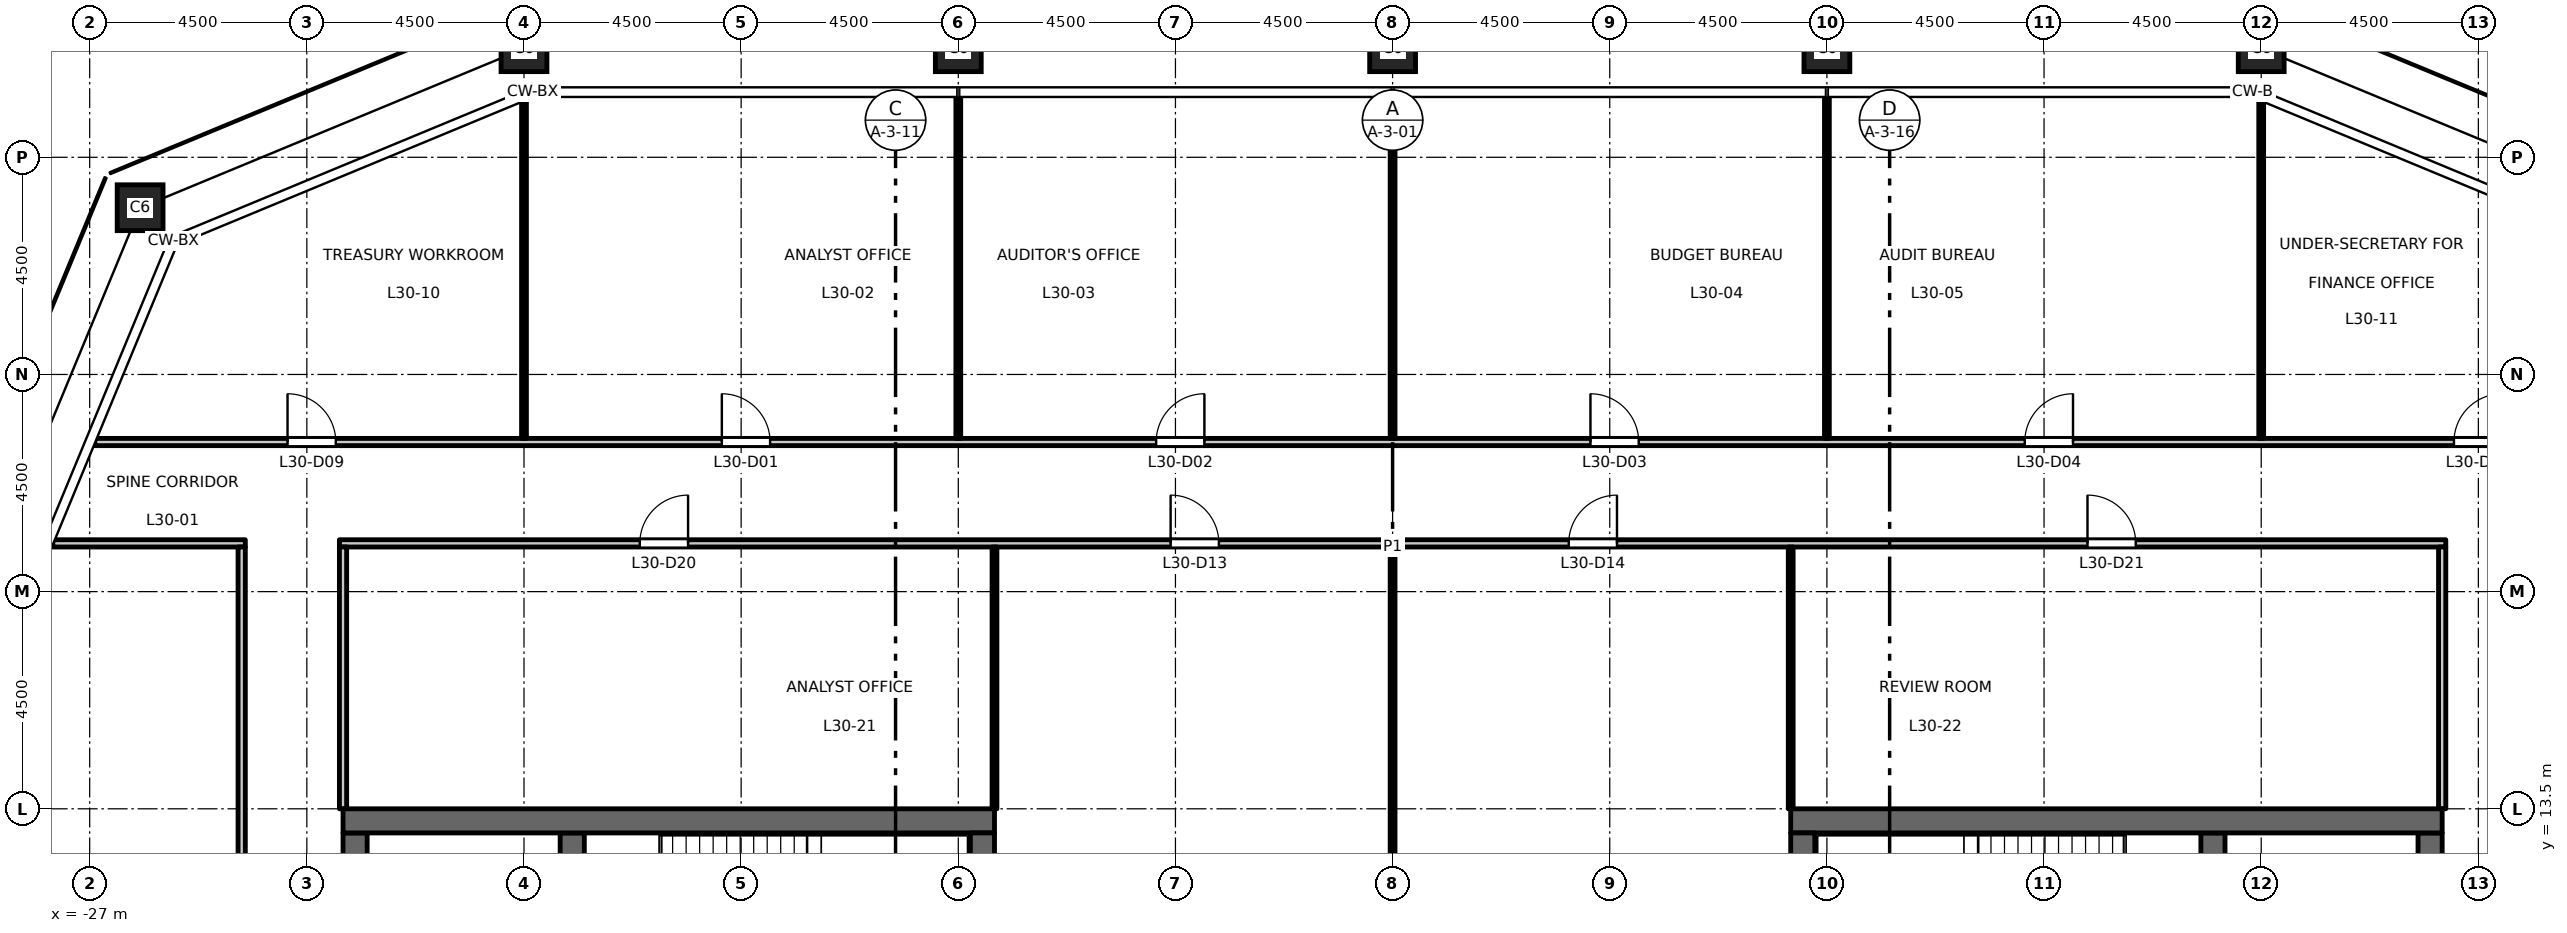
"""IFC4 building model, lengths in metres.
Left out: names, types, materials, properties, quantities, classifications, styles, units other than length and angle.
Written with IfcOpenShell. Run it as: python <this file> out.ifc"""

import sys

from ifc_helpers import new_model, si_unit, direction, frame, frame_2d, origin, origin_2d, place, context, subcontext, project, spatial, rectangle, hollow_rectangle, extrude, element, fill, save


model = new_model("IFC4")
c1 = context("Model", 3, precision=1e-05, world=origin(), true_north=direction((0.0, 1.0)))
c2 = subcontext(c1, "Body", "Model", "MODEL_VIEW")
j1 = project(units=[si_unit("LENGTHUNIT", "METRE"), si_unit("PLANEANGLEUNIT", "RADIAN")], contexts=[c1])
p1 = place(None, origin())
s1 = spatial("IfcSite", under=j1, at=p1, CompositionType="ELEMENT")
p2 = place(p1, origin())
s2 = spatial("IfcBuilding", under=s1, at=p2, CompositionType="ELEMENT")
p3 = place(p2, frame((0.0, 0.0, 140.7)))
s3 = spatial("IfcBuildingStorey", under=s2, at=p3, CompositionType="ELEMENT", Elevation=140.7)
for number, where, z_axis, x_axis in (
    (1, (18.0, 29.25, 0.0), (0.0, 0.0, 1.0), (1.0, 0.0, 0.0)),
    (2, (9.0, 29.25, 0.0), (0.0, 0.0, 1.0), (1.0, 0.0, 0.0)),
    (3, (0.0, 29.25, 0.0), (0.0, 0.0, 1.0), (1.0, 0.0, 0.0)),
    (4, (-9.0, 29.25, 0.0), (0.0, 0.0, 1.0), (1.0, 0.0, 0.0)),
    (5, (-18.0, 29.25, 0.0), (0.0, 0.0, 1.0), (1.0, 0.0, 0.0)),
    (6, (-25.955, 25.955, 0.0), (0.0, 0.0, 1.0), (1.0, 0.0, 0.0)),
):
    element("IfcColumn", number, at=place(p3, frame(where, z_axis=z_axis, x_axis=x_axis)), inside=s3, PredefinedType="COLUMN", context=c2, shape_type="SweptSolid", body=[
        extrude(hollow_rectangle(XDim=0.95, YDim=0.95, WallThickness=0.055, at=origin_2d()), origin(), (0.0, 0.0, 1.0), 4.5),
    ])
p4 = place(p3, frame((-21.5, -13.0, 0.0), z_axis=(0.0, 0.0, 1.0), x_axis=(0.0, 1.0, 0.0)))
e7 = element("IfcWall", 7, at=p4, inside=s3, PredefinedType="SHEAR", context=c2, shape_type="SweptSolid", body=[
    extrude(rectangle(XDim=26.0, YDim=0.5, at=frame_2d((13.0, 0.0))), origin(), (0.0, 0.0, 1.0), 4.35),
])
p5 = place(p4, frame((16.825, 0.0, 0.0)))
e8 = element("IfcOpeningElement", 8, at=p5, cuts=e7, PredefinedType="OPENING", context=c2, shape_type="SweptSolid", body=[
    extrude(rectangle(XDim=1.8, YDim=2.1, at=frame_2d((0.9, 1.05))), frame((0.0, 0.26, 0.0), z_axis=(0.0, -1.0, 0.0), x_axis=(1.0, 0.0, 0.0)), (0.0, 0.0, 1.0), 0.52),
])
p6 = place(p4, frame((7.375, 0.0, 0.0)))
e9 = element("IfcOpeningElement", 9, at=p6, cuts=e7, PredefinedType="OPENING", context=c2, shape_type="SweptSolid", body=[
    extrude(rectangle(XDim=1.8, YDim=2.1, at=frame_2d((0.9, 1.05))), frame((0.0, 0.26, 0.0), z_axis=(0.0, -1.0, 0.0), x_axis=(1.0, 0.0, 0.0)), (0.0, 0.0, 1.0), 0.52),
])
p7 = place(p4, frame((23.4, 0.0, 0.0)))
e10 = element("IfcOpeningElement", 10, at=p7, cuts=e7, PredefinedType="OPENING", context=c2, shape_type="SweptSolid", body=[
    extrude(rectangle(XDim=0.9, YDim=2.1, at=frame_2d((0.45, 1.05))), frame((0.0, 0.26, 0.0), z_axis=(0.0, -1.0, 0.0), x_axis=(1.0, 0.0, 0.0)), (0.0, 0.0, 1.0), 0.52),
])
p8 = place(p3, frame((-17.0, 6.425, 0.0), z_axis=(0.0, 0.0, 1.0), x_axis=(0.0, 1.0, 0.0)))
e11 = element("IfcWall", 11, at=p8, inside=s3, PredefinedType="SHEAR", context=c2, shape_type="SweptSolid", body=[
    extrude(rectangle(XDim=6.575, YDim=0.5, at=frame_2d((3.288, 0.0))), origin(), (0.0, 0.0, 1.0), 4.35),
])
p9 = place(p3, frame((-8.25, 13.25, 0.0), z_axis=(0.0, 0.0, 1.0), x_axis=(-1.0, 0.0, 0.0)))
e12 = element("IfcWall", 12, at=p9, inside=s3, PredefinedType="SHEAR", context=c2, shape_type="SweptSolid", body=[
    extrude(rectangle(XDim=13.5, YDim=0.5, at=frame_2d((6.75, 0.0))), origin(), (0.0, 0.0, 1.0), 4.35),
])
p10 = place(p3, frame((-8.5, -13.0, 0.0), z_axis=(0.0, 0.0, 1.0), x_axis=(0.0, 1.0, 0.0)))
e13 = element("IfcWall", 13, at=p10, inside=s3, PredefinedType="SHEAR", context=c2, shape_type="SweptSolid", body=[
    extrude(rectangle(XDim=26.0, YDim=0.5, at=frame_2d((13.0, 0.0))), origin(), (0.0, 0.0, 1.0), 4.35),
])
p11 = place(p3, frame((21.5, -13.0, 0.0), z_axis=(0.0, 0.0, 1.0), x_axis=(0.0, 1.0, 0.0)))
e14 = element("IfcWall", 14, at=p11, inside=s3, PredefinedType="SHEAR", context=c2, shape_type="SweptSolid", body=[
    extrude(rectangle(XDim=26.0, YDim=0.5, at=frame_2d((13.0, 0.0))), origin(), (0.0, 0.0, 1.0), 4.35),
])
p12 = place(p11, frame((16.825, 0.0, 0.0)))
e15 = element("IfcOpeningElement", 15, at=p12, cuts=e14, PredefinedType="OPENING", context=c2, shape_type="SweptSolid", body=[
    extrude(rectangle(XDim=1.8, YDim=2.1, at=frame_2d((0.9, 1.05))), frame((0.0, 0.26, 0.0), z_axis=(0.0, -1.0, 0.0), x_axis=(1.0, 0.0, 0.0)), (0.0, 0.0, 1.0), 0.52),
])
p13 = place(p11, frame((7.375, 0.0, 0.0)))
e16 = element("IfcOpeningElement", 16, at=p13, cuts=e14, PredefinedType="OPENING", context=c2, shape_type="SweptSolid", body=[
    extrude(rectangle(XDim=1.8, YDim=2.1, at=frame_2d((0.9, 1.05))), frame((0.0, 0.26, 0.0), z_axis=(0.0, -1.0, 0.0), x_axis=(1.0, 0.0, 0.0)), (0.0, 0.0, 1.0), 0.52),
])
p14 = place(p11, frame((2.65, 0.0, 0.0)))
e17 = element("IfcOpeningElement", 17, at=p14, cuts=e14, PredefinedType="OPENING", context=c2, shape_type="SweptSolid", body=[
    extrude(rectangle(XDim=0.9, YDim=2.1, at=frame_2d((0.45, 1.05))), frame((0.0, 0.26, 0.0), z_axis=(0.0, -1.0, 0.0), x_axis=(1.0, 0.0, 0.0)), (0.0, 0.0, 1.0), 0.52),
])
p15 = place(p3, frame((17.0, 6.425, 0.0), z_axis=(0.0, 0.0, 1.0), x_axis=(0.0, 1.0, 0.0)))
e18 = element("IfcWall", 18, at=p15, inside=s3, PredefinedType="SHEAR", context=c2, shape_type="SweptSolid", body=[
    extrude(rectangle(XDim=6.575, YDim=0.5, at=frame_2d((3.288, 0.0))), origin(), (0.0, 0.0, 1.0), 4.35),
])
p16 = place(p3, frame((8.25, 13.25, 0.0), z_axis=(0.0, 0.0, 1.0), x_axis=(1.0, 0.0, 0.0)))
e19 = element("IfcWall", 19, at=p16, inside=s3, PredefinedType="SHEAR", context=c2, shape_type="SweptSolid", body=[
    extrude(rectangle(XDim=13.5, YDim=0.5, at=frame_2d((6.75, 0.0))), origin(), (0.0, 0.0, 1.0), 4.35),
])
p17 = place(p3, frame((8.5, -13.0, 0.0), z_axis=(0.0, 0.0, 1.0), x_axis=(0.0, 1.0, 0.0)))
e20 = element("IfcWall", 20, at=p17, inside=s3, PredefinedType="SHEAR", context=c2, shape_type="SweptSolid", body=[
    extrude(rectangle(XDim=26.0, YDim=0.5, at=frame_2d((13.0, 0.0))), origin(), (0.0, 0.0, 1.0), 4.35),
])
p18 = place(p3, frame((-27.764, 19.0, 0.0), z_axis=(0.0, 0.0, 1.0), x_axis=(1.0, 0.0, 0.0)))
e21 = element("IfcWall", 21, at=p18, inside=s3, PredefinedType="PARTITIONING", context=c2, shape_type="SweptSolid", body=[
    extrude(rectangle(XDim=3.989, YDim=0.15, at=frame_2d((1.995, 0.0))), origin(), (0.0, 0.0, 1.0), 4.35),
])
p19 = place(p3, frame((-21.825, 19.0, 0.0), z_axis=(0.0, 0.0, 1.0), x_axis=(1.0, 0.0, 0.0)))
e22 = element("IfcWall", 22, at=p19, inside=s3, PredefinedType="PARTITIONING", context=c2, shape_type="SweptSolid", body=[
    extrude(rectangle(XDim=43.65, YDim=0.15, at=frame_2d((21.825, 0.0))), origin(), (0.0, 0.0, 1.0), 4.35),
])
p20 = place(p19, frame((17.225, 0.0, 0.0)))
e23 = element("IfcOpeningElement", 23, at=p20, cuts=e22, PredefinedType="OPENING", context=c2, shape_type="SweptSolid", body=[
    extrude(rectangle(XDim=1.0, YDim=2.1, at=frame_2d((0.5, 1.05))), frame((0.0, 0.085, 0.0), z_axis=(0.0, -1.0, 0.0), x_axis=(1.0, 0.0, 0.0)), (0.0, 0.0, 1.0), 0.17),
])
p21 = place(p19, frame((25.475, 0.0, 0.0)))
e24 = element("IfcOpeningElement", 24, at=p21, cuts=e22, PredefinedType="OPENING", context=c2, shape_type="SweptSolid", body=[
    extrude(rectangle(XDim=1.0, YDim=2.1, at=frame_2d((0.5, 1.05))), frame((0.0, 0.085, 0.0), z_axis=(0.0, -1.0, 0.0), x_axis=(1.0, 0.0, 0.0)), (0.0, 0.0, 1.0), 0.17),
])
p22 = place(p19, frame((6.225, 0.0, 0.0)))
e25 = element("IfcOpeningElement", 25, at=p22, cuts=e22, PredefinedType="OPENING", context=c2, shape_type="SweptSolid", body=[
    extrude(rectangle(XDim=1.0, YDim=2.1, at=frame_2d((0.5, 1.05))), frame((0.0, 0.085, 0.0), z_axis=(0.0, -1.0, 0.0), x_axis=(1.0, 0.0, 0.0)), (0.0, 0.0, 1.0), 0.17),
])
p23 = place(p19, frame((36.225, 0.0, 0.0)))
e26 = element("IfcOpeningElement", 26, at=p23, cuts=e22, PredefinedType="OPENING", context=c2, shape_type="SweptSolid", body=[
    extrude(rectangle(XDim=1.0, YDim=2.1, at=frame_2d((0.5, 1.05))), frame((0.0, 0.085, 0.0), z_axis=(0.0, -1.0, 0.0), x_axis=(1.0, 0.0, 0.0)), (0.0, 0.0, 1.0), 0.17),
])
p24 = place(p3, frame((-26.894, 21.1, 0.0), z_axis=(0.0, 0.0, 1.0), x_axis=(1.0, 0.0, 0.0)))
e27 = element("IfcWall", 27, at=p24, inside=s3, PredefinedType="PARTITIONING", context=c2, shape_type="SweptSolid", body=[
    extrude(rectangle(XDim=53.788, YDim=0.15, at=frame_2d((26.894, 0.0))), origin(), (0.0, 0.0, 1.0), 4.35),
])
p25 = place(p24, frame((12.994, 0.0, 0.0)))
e28 = element("IfcOpeningElement", 28, at=p25, cuts=e27, PredefinedType="OPENING", context=c2, shape_type="SweptSolid", body=[
    extrude(rectangle(XDim=1.0, YDim=2.1, at=frame_2d((0.5, 1.05))), frame((0.0, 0.085, 0.0), z_axis=(0.0, -1.0, 0.0), x_axis=(1.0, 0.0, 0.0)), (0.0, 0.0, 1.0), 0.17),
])
p26 = place(p24, frame((21.994, 0.0, 0.0)))
e29 = element("IfcOpeningElement", 29, at=p26, cuts=e27, PredefinedType="OPENING", context=c2, shape_type="SweptSolid", body=[
    extrude(rectangle(XDim=1.0, YDim=2.1, at=frame_2d((0.5, 1.05))), frame((0.0, 0.085, 0.0), z_axis=(0.0, -1.0, 0.0), x_axis=(1.0, 0.0, 0.0)), (0.0, 0.0, 1.0), 0.17),
])
p27 = place(p24, frame((30.994, 0.0, 0.0)))
e30 = element("IfcOpeningElement", 30, at=p27, cuts=e27, PredefinedType="OPENING", context=c2, shape_type="SweptSolid", body=[
    extrude(rectangle(XDim=1.0, YDim=2.1, at=frame_2d((0.5, 1.05))), frame((0.0, 0.085, 0.0), z_axis=(0.0, -1.0, 0.0), x_axis=(1.0, 0.0, 0.0)), (0.0, 0.0, 1.0), 0.17),
])
p28 = place(p24, frame((39.994, 0.0, 0.0)))
e31 = element("IfcOpeningElement", 31, at=p28, cuts=e27, PredefinedType="OPENING", context=c2, shape_type="SweptSolid", body=[
    extrude(rectangle(XDim=1.0, YDim=2.1, at=frame_2d((0.5, 1.05))), frame((0.0, 0.085, 0.0), z_axis=(0.0, -1.0, 0.0), x_axis=(1.0, 0.0, 0.0)), (0.0, 0.0, 1.0), 0.17),
])
p29 = place(p24, frame((3.994, 0.0, 0.0)))
e32 = element("IfcOpeningElement", 32, at=p29, cuts=e27, PredefinedType="OPENING", context=c2, shape_type="SweptSolid", body=[
    extrude(rectangle(XDim=1.0, YDim=2.1, at=frame_2d((0.5, 1.05))), frame((0.0, 0.085, 0.0), z_axis=(0.0, -1.0, 0.0), x_axis=(1.0, 0.0, 0.0)), (0.0, 0.0, 1.0), 0.17),
])
p30 = place(p24, frame((48.888, 0.0, 0.0)))
e33 = element("IfcOpeningElement", 33, at=p30, cuts=e27, PredefinedType="OPENING", context=c2, shape_type="SweptSolid", body=[
    extrude(rectangle(XDim=1.0, YDim=2.1, at=frame_2d((0.5, 1.05))), frame((0.0, 0.085, 0.0), z_axis=(0.0, -1.0, 0.0), x_axis=(1.0, 0.0, 0.0)), (0.0, 0.0, 1.0), 0.17),
])
p31 = place(p3, frame((-23.85, -18.925, 0.0), z_axis=(0.0, 0.0, 1.0), x_axis=(0.0, 1.0, 0.0)))
e34 = element("IfcWall", 34, at=p31, inside=s3, PredefinedType="PARTITIONING", context=c2, shape_type="SweptSolid", body=[
    extrude(rectangle(XDim=37.85, YDim=0.15, at=frame_2d((18.925, 0.0))), origin(), (0.0, 0.0, 1.0), 4.35),
])
p32 = place(p31, frame((18.525, 0.0, 0.0)))
e35 = element("IfcOpeningElement", 35, at=p32, cuts=e34, PredefinedType="OPENING", context=c2, shape_type="SweptSolid", body=[
    extrude(rectangle(XDim=1.0, YDim=2.1, at=frame_2d((0.5, 1.05))), frame((0.0, 0.085, 0.0), z_axis=(0.0, -1.0, 0.0), x_axis=(1.0, 0.0, 0.0)), (0.0, 0.0, 1.0), 0.17),
])
p33 = place(p3, frame((-21.75, 13.5, 0.0), z_axis=(0.0, 0.0, 1.0), x_axis=(0.0, 1.0, 0.0)))
e36 = element("IfcWall", 36, at=p33, inside=s3, PredefinedType="PARTITIONING", context=c2, shape_type="SweptSolid", body=[
    extrude(rectangle(XDim=5.425, YDim=0.15, at=frame_2d((2.712, 0.0))), origin(), (0.0, 0.0, 1.0), 4.35),
])
p34 = place(p3, frame((-18.0, 21.175, 0.0), z_axis=(0.0, 0.0, 1.0), x_axis=(0.0, 1.0, 0.0)))
e37 = element("IfcWall", 37, at=p34, inside=s3, PredefinedType="PARTITIONING", context=c2, shape_type="SweptSolid", body=[
    extrude(rectangle(XDim=7.003, YDim=0.1, at=frame_2d((3.501, 0.0))), origin(), (0.0, 0.0, 1.0), 3.45),
])
p35 = place(p3, frame((-9.0, 21.175, 0.0), z_axis=(0.0, 0.0, 1.0), x_axis=(0.0, 1.0, 0.0)))
e38 = element("IfcWall", 38, at=p35, inside=s3, PredefinedType="PARTITIONING", context=c2, shape_type="SweptSolid", body=[
    extrude(rectangle(XDim=7.085, YDim=0.1, at=frame_2d((3.542, 0.0))), origin(), (0.0, 0.0, 1.0), 3.45),
])
p36 = place(p3, frame((-8.25, 13.5, 0.0), z_axis=(0.0, 0.0, 1.0), x_axis=(0.0, 1.0, 0.0)))
e39 = element("IfcWall", 39, at=p36, inside=s3, PredefinedType="PARTITIONING", context=c2, shape_type="SweptSolid", body=[
    extrude(rectangle(XDim=5.425, YDim=0.1, at=frame_2d((2.712, 0.0))), origin(), (0.0, 0.0, 1.0), 4.35),
])
p37 = place(p3, frame((0.0, 8.65, 0.0), z_axis=(0.0, 0.0, 1.0), x_axis=(0.0, 1.0, 0.0)))
e40 = element("IfcWall", 40, at=p37, inside=s3, PredefinedType="PARTITIONING", context=c2, shape_type="SweptSolid", body=[
    extrude(rectangle(XDim=10.275, YDim=0.1, at=frame_2d((5.138, 0.0))), origin(), (0.0, 0.0, 1.0), 3.45),
])
p38 = place(p3, frame((0.0, 21.175, 0.0), z_axis=(0.0, 0.0, 1.0), x_axis=(0.0, 1.0, 0.0)))
e41 = element("IfcWall", 41, at=p38, inside=s3, PredefinedType="PARTITIONING", context=c2, shape_type="SweptSolid", body=[
    extrude(rectangle(XDim=7.085, YDim=0.1, at=frame_2d((3.542, 0.0))), origin(), (0.0, 0.0, 1.0), 3.45),
])
p39 = place(p3, frame((8.25, 13.5, 0.0), z_axis=(0.0, 0.0, 1.0), x_axis=(0.0, 1.0, 0.0)))
e42 = element("IfcWall", 42, at=p39, inside=s3, PredefinedType="PARTITIONING", context=c2, shape_type="SweptSolid", body=[
    extrude(rectangle(XDim=5.425, YDim=0.1, at=frame_2d((2.712, 0.0))), origin(), (0.0, 0.0, 1.0), 4.35),
])
p40 = place(p3, frame((9.0, 21.175, 0.0), z_axis=(0.0, 0.0, 1.0), x_axis=(0.0, 1.0, 0.0)))
e43 = element("IfcWall", 43, at=p40, inside=s3, PredefinedType="PARTITIONING", context=c2, shape_type="SweptSolid", body=[
    extrude(rectangle(XDim=7.085, YDim=0.1, at=frame_2d((3.542, 0.0))), origin(), (0.0, 0.0, 1.0), 3.45),
])
p41 = place(p3, frame((18.0, 21.175, 0.0), z_axis=(0.0, 0.0, 1.0), x_axis=(0.0, 1.0, 0.0)))
e44 = element("IfcWall", 44, at=p41, inside=s3, PredefinedType="PARTITIONING", context=c2, shape_type="SweptSolid", body=[
    extrude(rectangle(XDim=7.003, YDim=0.1, at=frame_2d((3.501, 0.0))), origin(), (0.0, 0.0, 1.0), 3.45),
])
p42 = place(p3, frame((21.75, 13.5, 0.0), z_axis=(0.0, 0.0, 1.0), x_axis=(0.0, 1.0, 0.0)))
e45 = element("IfcWall", 45, at=p42, inside=s3, PredefinedType="PARTITIONING", context=c2, shape_type="SweptSolid", body=[
    extrude(rectangle(XDim=5.425, YDim=0.15, at=frame_2d((2.712, 0.0))), origin(), (0.0, 0.0, 1.0), 4.35),
])
p43 = place(p25, origin())
e46 = element("IfcDoor", 46, at=p43, inside=s3, OperationType="SINGLE_SWING_LEFT", PredefinedType="DOOR", context=c2, shape_type="SweptSolid", body=[
    extrude(rectangle(XDim=1.0, YDim=2.1, at=frame_2d((0.5, 1.05))), frame((0.0, 0.025, 0.0), z_axis=(0.0, -1.0, 0.0), x_axis=(1.0, 0.0, 0.0)), (0.0, 0.0, 1.0), 0.05),
])
fill(e28, e46)
p44 = place(p26, origin())
e47 = element("IfcDoor", 47, at=p44, inside=s3, OperationType="SINGLE_SWING_RIGHT", PredefinedType="DOOR", context=c2, shape_type="SweptSolid", body=[
    extrude(rectangle(XDim=1.0, YDim=2.1, at=frame_2d((0.5, 1.05))), frame((0.0, 0.025, 0.0), z_axis=(0.0, -1.0, 0.0), x_axis=(1.0, 0.0, 0.0)), (0.0, 0.0, 1.0), 0.05),
])
fill(e29, e47)
p45 = place(p27, origin())
e48 = element("IfcDoor", 48, at=p45, inside=s3, OperationType="SINGLE_SWING_LEFT", PredefinedType="DOOR", context=c2, shape_type="SweptSolid", body=[
    extrude(rectangle(XDim=1.0, YDim=2.1, at=frame_2d((0.5, 1.05))), frame((0.0, 0.025, 0.0), z_axis=(0.0, -1.0, 0.0), x_axis=(1.0, 0.0, 0.0)), (0.0, 0.0, 1.0), 0.05),
])
fill(e30, e48)
p46 = place(p28, origin())
e49 = element("IfcDoor", 49, at=p46, inside=s3, OperationType="SINGLE_SWING_RIGHT", PredefinedType="DOOR", context=c2, shape_type="SweptSolid", body=[
    extrude(rectangle(XDim=1.0, YDim=2.1, at=frame_2d((0.5, 1.05))), frame((0.0, 0.025, 0.0), z_axis=(0.0, -1.0, 0.0), x_axis=(1.0, 0.0, 0.0)), (0.0, 0.0, 1.0), 0.05),
])
fill(e31, e49)
p47 = place(p29, origin())
e50 = element("IfcDoor", 50, at=p47, inside=s3, OperationType="SINGLE_SWING_LEFT", PredefinedType="DOOR", context=c2, shape_type="SweptSolid", body=[
    extrude(rectangle(XDim=1.0, YDim=2.1, at=frame_2d((0.5, 1.05))), frame((0.0, 0.025, 0.0), z_axis=(0.0, -1.0, 0.0), x_axis=(1.0, 0.0, 0.0)), (0.0, 0.0, 1.0), 0.05),
])
fill(e32, e50)
p48 = place(p30, origin())
e51 = element("IfcDoor", 51, at=p48, inside=s3, OperationType="SINGLE_SWING_RIGHT", PredefinedType="DOOR", context=c2, shape_type="SweptSolid", body=[
    extrude(rectangle(XDim=1.0, YDim=2.1, at=frame_2d((0.5, 1.05))), frame((0.0, 0.025, 0.0), z_axis=(0.0, -1.0, 0.0), x_axis=(1.0, 0.0, 0.0)), (0.0, 0.0, 1.0), 0.05),
])
fill(e33, e51)
p49 = place(p20, origin())
e52 = element("IfcDoor", 52, at=p49, inside=s3, OperationType="SINGLE_SWING_LEFT", PredefinedType="DOOR", context=c2, shape_type="SweptSolid", body=[
    extrude(rectangle(XDim=1.0, YDim=2.1, at=frame_2d((0.5, 1.05))), frame((0.0, 0.025, 0.0), z_axis=(0.0, -1.0, 0.0), x_axis=(1.0, 0.0, 0.0)), (0.0, 0.0, 1.0), 0.05),
])
fill(e23, e52)
p50 = place(p21, origin())
e53 = element("IfcDoor", 53, at=p50, inside=s3, OperationType="SINGLE_SWING_RIGHT", PredefinedType="DOOR", context=c2, shape_type="SweptSolid", body=[
    extrude(rectangle(XDim=1.0, YDim=2.1, at=frame_2d((0.5, 1.05))), frame((0.0, 0.025, 0.0), z_axis=(0.0, -1.0, 0.0), x_axis=(1.0, 0.0, 0.0)), (0.0, 0.0, 1.0), 0.05),
])
fill(e24, e53)
p51 = place(p22, origin())
e54 = element("IfcDoor", 54, at=p51, inside=s3, OperationType="SINGLE_SWING_RIGHT", PredefinedType="DOOR", context=c2, shape_type="SweptSolid", body=[
    extrude(rectangle(XDim=1.0, YDim=2.1, at=frame_2d((0.5, 1.05))), frame((0.0, 0.025, 0.0), z_axis=(0.0, -1.0, 0.0), x_axis=(1.0, 0.0, 0.0)), (0.0, 0.0, 1.0), 0.05),
])
fill(e25, e54)
p52 = place(p23, origin())
e55 = element("IfcDoor", 55, at=p52, inside=s3, OperationType="SINGLE_SWING_LEFT", PredefinedType="DOOR", context=c2, shape_type="SweptSolid", body=[
    extrude(rectangle(XDim=1.0, YDim=2.1, at=frame_2d((0.5, 1.05))), frame((0.0, 0.025, 0.0), z_axis=(0.0, -1.0, 0.0), x_axis=(1.0, 0.0, 0.0)), (0.0, 0.0, 1.0), 0.05),
])
fill(e26, e55)
save(model, sys.argv[1])
